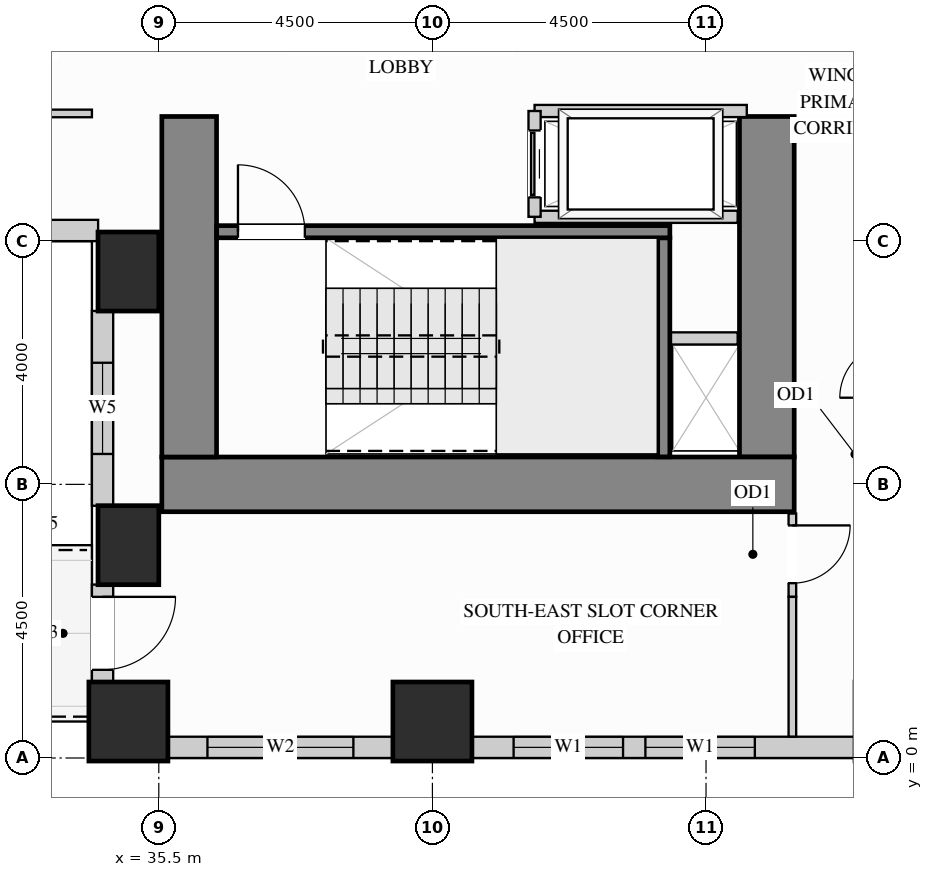
"""IFC4 building model, lengths in metres.
Left out: names, types, materials, properties, quantities, classifications, styles, units other than length and angle.
Written with IfcOpenShell. Run it as: python <this file> out.ifc"""

import sys

from ifc_helpers import new_model, si_unit, direction, frame, frame_2d, origin, origin_2d, place, context, subcontext, project, spatial, rectangle, extrude, source, transform, mapped, element, fill, save


model = new_model("IFC4")
c1 = context("Model", 3, precision=1e-05, world=origin(), true_north=direction((0.0, 1.0)))
c2 = subcontext(c1, "Body", "Model", "MODEL_VIEW")
j1 = project(units=[si_unit("LENGTHUNIT", "METRE"), si_unit("PLANEANGLEUNIT", "RADIAN")], contexts=[c1])
p1 = place(None, origin())
s1 = spatial("IfcSite", under=j1, at=p1, CompositionType="ELEMENT")
p2 = place(p1, origin())
s2 = spatial("IfcBuilding", under=s1, at=p2, CompositionType="ELEMENT")
p3 = place(p2, frame((0.0, 0.0, 62.1)))
s3 = spatial("IfcBuildingStorey", under=s2, at=p3, CompositionType="ELEMENT", Elevation=62.1)
m1 = source(origin(), c2, "Body", "SweptSolid", [
    extrude(rectangle(XDim=1.0, YDim=1.3, at=origin_2d()), origin(), (0.0, 0.0, 1.0), 3.38),
])
for number, where, z_axis, x_axis in (
    (1, (35.0, 3.5, 0.0), (0.0, 0.0, 1.0), (1.0, 0.0, 0.0)),
    (2, (35.0, 8.0, 0.0), (0.0, 0.0, 1.0), (1.0, 0.0, 0.0)),
):
    element("IfcColumn", number, at=place(p3, frame(where, z_axis=z_axis, x_axis=x_axis)), inside=s3, PredefinedType="COLUMN", context=c2, shape_type="MappedRepresentation", body=[
        mapped(m1, transform((0.0, 0.0, 0.0), x_axis=(1.0, 0.0, 0.0), y_axis=(0.0, 1.0, 0.0), z_axis=(0.0, 0.0, 1.0))),
    ])
m2 = source(origin(), c2, "Body", "SweptSolid", [
    extrude(rectangle(XDim=1.3, YDim=1.3, at=origin_2d()), origin(), (0.0, 0.0, 1.0), 3.38),
])
for number, where, z_axis, x_axis in (
    (3, (35.0, 0.6, 0.0), (0.0, 0.0, 1.0), (1.0, 0.0, 0.0)),
    (4, (40.0, 0.6, 0.0), (0.0, 0.0, 1.0), (1.0, 0.0, 0.0)),
):
    element("IfcColumn", number, at=place(p3, frame(where, z_axis=z_axis, x_axis=x_axis)), inside=s3, PredefinedType="COLUMN", context=c2, shape_type="MappedRepresentation", body=[
        mapped(m2, transform((0.0, 0.0, 0.0), x_axis=(1.0, 0.0, 0.0), y_axis=(0.0, 1.0, 0.0), z_axis=(0.0, 0.0, 1.0))),
    ])
m3 = source(origin(), c2, "Body", "SweptSolid", [
    extrude(rectangle(XDim=5.6, YDim=0.9, at=frame_2d((2.8, 0.0))), origin(), (0.0, 0.0, 1.0), 3.38),
])
p4 = place(p3, frame((45.5, 4.95, 0.0), z_axis=(0.0, 0.0, 1.0), x_axis=(0.0, 1.0, 0.0)))
e5 = element("IfcWall", 5, at=p4, inside=s3, PredefinedType="SHEAR", context=c2, shape_type="MappedRepresentation", body=[
    mapped(m3, transform((0.0, 0.0, 0.0), x_axis=(1.0, 0.0, 0.0), y_axis=(0.0, 1.0, 0.0), z_axis=(0.0, 0.0, 1.0))),
])
m4 = source(origin(), c2, "Body", "SweptSolid", [
    extrude(rectangle(XDim=10.4, YDim=0.9, at=frame_2d((5.2, 0.0))), origin(), (0.0, 0.0, 1.0), 3.38),
])
p5 = place(p3, frame((35.55, 4.5, 0.0), z_axis=(0.0, 0.0, 1.0), x_axis=(1.0, 0.0, 0.0)))
e6 = element("IfcWall", 6, at=p5, inside=s3, PredefinedType="SHEAR", context=c2, shape_type="MappedRepresentation", body=[
    mapped(m4, transform((0.0, 0.0, 0.0), x_axis=(1.0, 0.0, 0.0), y_axis=(0.0, 1.0, 0.0), z_axis=(0.0, 0.0, 1.0))),
])
p6 = place(p3, frame((36.0, 4.95, 0.0), z_axis=(0.0, 0.0, 1.0), x_axis=(0.0, 1.0, 0.0)))
e7 = element("IfcWall", 7, at=p6, inside=s3, PredefinedType="SHEAR", context=c2, shape_type="MappedRepresentation", body=[
    mapped(m3, transform((0.0, 0.0, 0.0), x_axis=(1.0, 0.0, 0.0), y_axis=(0.0, 1.0, 0.0), z_axis=(0.0, 0.0, 1.0))),
])
p7 = place(p3, frame((30.998, 8.675, 0.0), z_axis=(0.0, 0.0, 1.0), x_axis=(1.0, 0.0, 0.0)))
e8 = element("IfcWall", 8, at=p7, inside=s3, PredefinedType="SOLIDWALL", context=c2, shape_type="SweptSolid", body=[
    extrude(rectangle(XDim=3.504, YDim=0.35, at=frame_2d((1.752, 0.0))), origin(), (0.0, 0.0, 1.0), 3.365),
])
p8 = place(p7, frame((1.002, 0.0, 0.78)))
e9 = element("IfcOpeningElement", 9, at=p8, cuts=e8, PredefinedType="OPENING", context=c2, shape_type="SweptSolid", body=[
    extrude(rectangle(XDim=1.5, YDim=2.0, at=frame_2d((0.75, 1.0))), frame((0.0, 0.185, 0.0), z_axis=(0.0, -1.0, 0.0), x_axis=(1.0, 0.0, 0.0)), (0.0, 0.0, 1.0), 0.37),
])
p9 = place(p3, frame((34.575, 7.352, 0.0), z_axis=(0.0, 0.0, 1.0), x_axis=(0.0, -1.0, 0.0)))
e10 = element("IfcWall", 10, at=p9, inside=s3, PredefinedType="SOLIDWALL", context=c2, shape_type="SweptSolid", body=[
    extrude(rectangle(XDim=3.204, YDim=0.35, at=frame_2d((1.602, 0.0))), origin(), (0.0, 0.0, 1.0), 2.51),
])
p10 = place(p9, frame((0.852, 0.0, 0.78)))
e11 = element("IfcOpeningElement", 11, at=p10, cuts=e10, PredefinedType="OPENING", context=c2, shape_type="SweptSolid", body=[
    extrude(rectangle(XDim=1.5, YDim=1.55, at=frame_2d((0.75, 0.775))), frame((0.0, 0.185, 0.0), z_axis=(0.0, -1.0, 0.0), x_axis=(1.0, 0.0, 0.0)), (0.0, 0.0, 1.0), 0.37),
])
p11 = place(p3, frame((34.575, 2.852, 0.0), z_axis=(0.0, 0.0, 1.0), x_axis=(0.0, -1.0, 0.0)))
e12 = element("IfcWall", 12, at=p11, inside=s3, PredefinedType="SOLIDWALL", context=c2, shape_type="SweptSolid", body=[
    extrude(rectangle(XDim=1.604, YDim=0.35, at=frame_2d((0.802, 0.0))), origin(), (0.0, 0.0, 1.0), 2.51),
])
p12 = place(p11, frame((0.202, 0.0, 0.0)))
e13 = element("IfcOpeningElement", 13, at=p12, cuts=e12, PredefinedType="OPENING", context=c2, shape_type="SweptSolid", body=[
    extrude(rectangle(XDim=1.2, YDim=2.15, at=frame_2d((0.6, 1.075))), frame((0.0, 0.185, 0.0), z_axis=(0.0, -1.0, 0.0), x_axis=(1.0, 0.0, 0.0)), (0.0, 0.0, 1.0), 0.37),
])
p13 = place(p3, frame((35.648, 0.175, 0.0), z_axis=(0.0, 0.0, 1.0), x_axis=(1.0, 0.0, 0.0)))
e14 = element("IfcWall", 14, at=p13, inside=s3, PredefinedType="SOLIDWALL", context=c2, shape_type="SweptSolid", body=[
    extrude(rectangle(XDim=3.704, YDim=0.35, at=frame_2d((1.852, 0.0))), origin(), (0.0, 0.0, 1.0), 2.51),
])
p14 = place(p13, frame((0.652, 0.0, 0.78)))
e15 = element("IfcOpeningElement", 15, at=p14, cuts=e14, PredefinedType="OPENING", context=c2, shape_type="SweptSolid", body=[
    extrude(rectangle(XDim=2.4, YDim=1.55, at=frame_2d((1.2, 0.775))), frame((0.0, 0.185, 0.0), z_axis=(0.0, -1.0, 0.0), x_axis=(1.0, 0.0, 0.0)), (0.0, 0.0, 1.0), 0.37),
])
p15 = place(p3, frame((40.648, 0.175, 0.0), z_axis=(0.0, 0.0, 1.0), x_axis=(1.0, 0.0, 0.0)))
e16 = element("IfcWall", 16, at=p15, inside=s3, PredefinedType="SOLIDWALL", context=c2, shape_type="SweptSolid", body=[
    extrude(rectangle(XDim=6.304, YDim=0.35, at=frame_2d((3.152, 0.0))), origin(), (0.0, 0.0, 1.0), 2.51),
])
p16 = place(p15, frame((0.687, 0.0, 0.78)))
e17 = element("IfcOpeningElement", 17, at=p16, cuts=e16, PredefinedType="OPENING", context=c2, shape_type="SweptSolid", body=[
    extrude(rectangle(XDim=1.8, YDim=1.55, at=frame_2d((0.9, 0.775))), frame((0.0, 0.185, 0.0), z_axis=(0.0, -1.0, 0.0), x_axis=(1.0, 0.0, 0.0)), (0.0, 0.0, 1.0), 0.37),
])
p17 = place(p15, frame((2.855, 0.0, 0.78)))
e18 = element("IfcOpeningElement", 18, at=p17, cuts=e16, PredefinedType="OPENING", context=c2, shape_type="SweptSolid", body=[
    extrude(rectangle(XDim=1.8, YDim=1.55, at=frame_2d((0.9, 0.775))), frame((0.0, 0.185, 0.0), z_axis=(0.0, -1.0, 0.0), x_axis=(1.0, 0.0, 0.0)), (0.0, 0.0, 1.0), 0.37),
])
p18 = place(p3, frame((45.92, 2.65, 0.0), z_axis=(0.0, 0.0, 1.0), x_axis=(0.0, 1.0, 0.0)))
e19 = element("IfcWall", 19, at=p18, inside=s3, PredefinedType="PARTITIONING", context=c2, shape_type="SweptSolid", body=[
    extrude(rectangle(XDim=1.37, YDim=0.125, at=frame_2d((0.685, 0.0))), origin(), (0.0, 0.0, 1.0), 3.365),
])
p19 = place(p18, frame((0.225, 0.0, 0.0)))
e20 = element("IfcOpeningElement", 20, at=p19, cuts=e19, PredefinedType="OPENING", context=c2, shape_type="SweptSolid", body=[
    extrude(rectangle(XDim=0.95, YDim=2.15, at=frame_2d((0.475, 1.075))), frame((0.0, 0.073, 0.0), z_axis=(0.0, -1.0, 0.0), x_axis=(1.0, 0.0, 0.0)), (0.0, 0.0, 1.0), 0.145),
])
m5 = source(origin(), c2, "Body", "SweptSolid", [
    extrude(rectangle(XDim=2.298, YDim=0.125, at=frame_2d((1.149, 0.0))), origin(), (0.0, 0.0, 1.0), 3.365),
])
p20 = place(p3, frame((45.92, 0.352, 0.0), z_axis=(0.0, 0.0, 1.0), x_axis=(0.0, 1.0, 0.0)))
e21 = element("IfcWall", 21, at=p20, inside=s3, PredefinedType="PARTITIONING", context=c2, shape_type="MappedRepresentation", body=[
    mapped(m5, transform((0.0, 0.0, 0.0), x_axis=(1.0, 0.0, 0.0), y_axis=(0.0, 1.0, 0.0), z_axis=(0.0, 0.0, 1.0))),
])
p21 = place(p3, frame((26.95, 10.6, 0.0), z_axis=(0.0, 0.0, 1.0), x_axis=(1.0, 0.0, 0.0)))
e22 = element("IfcWall", 22, at=p21, inside=s3, PredefinedType="PARTITIONING", context=c2, shape_type="SweptSolid", body=[
    extrude(rectangle(XDim=7.45, YDim=0.125, at=frame_2d((3.725, 0.0))), origin(), (0.0, 0.0, 1.0), 3.365),
])
p22 = place(p21, frame((4.683, 0.0, 0.0)))
e23 = element("IfcOpeningElement", 23, at=p22, cuts=e22, PredefinedType="OPENING", context=c2, shape_type="SweptSolid", body=[
    extrude(rectangle(XDim=0.95, YDim=2.15, at=frame_2d((0.475, 1.075))), frame((0.0, 0.073, 0.0), z_axis=(0.0, -1.0, 0.0), x_axis=(1.0, 0.0, 0.0)), (0.0, 0.0, 1.0), 0.145),
])
m6 = source(origin(), c2, "Body", "SweptSolid", [
    extrude(rectangle(XDim=1.17, YDim=0.2, at=frame_2d((0.585, 0.0))), origin(), (0.0, 0.0, 1.0), 3.365),
])
p23 = place(p3, frame((43.85, 6.9, 0.0), z_axis=(0.0, 0.0, 1.0), x_axis=(1.0, 0.0, 0.0)))
e24 = element("IfcWall", 24, at=p23, inside=s3, PredefinedType="PARTITIONING", context=c2, shape_type="MappedRepresentation", body=[
    mapped(m6, transform((0.0, 0.0, 0.0), x_axis=(1.0, 0.0, 0.0), y_axis=(0.0, 1.0, 0.0), z_axis=(0.0, 0.0, 1.0))),
])
m7 = source(origin(), c2, "Body", "SweptSolid", [
    extrude(rectangle(XDim=3.49, YDim=0.2, at=frame_2d((1.745, 0.0))), origin(), (0.0, 0.0, 1.0), 3.365),
])
p24 = place(p3, frame((41.68, 10.64, 0.0), z_axis=(0.0, 0.0, 1.0), x_axis=(1.0, 0.0, 0.0)))
e25 = element("IfcWall", 25, at=p24, inside=s3, PredefinedType="PARTITIONING", context=c2, shape_type="MappedRepresentation", body=[
    mapped(m7, transform((0.0, 0.0, 0.0), x_axis=(1.0, 0.0, 0.0), y_axis=(0.0, 1.0, 0.0), z_axis=(0.0, 0.0, 1.0))),
])
m8 = source(origin(), c2, "Body", "SweptSolid", [
    extrude(rectangle(XDim=3.34, YDim=0.2, at=frame_2d((1.67, 0.0))), origin(), (0.0, 0.0, 1.0), 3.365),
])
p25 = place(p3, frame((41.68, 8.9, 0.0), z_axis=(0.0, 0.0, 1.0), x_axis=(1.0, 0.0, 0.0)))
e26 = element("IfcWall", 26, at=p25, inside=s3, PredefinedType="PARTITIONING", context=c2, shape_type="MappedRepresentation", body=[
    mapped(m8, transform((0.0, 0.0, 0.0), x_axis=(1.0, 0.0, 0.0), y_axis=(0.0, 1.0, 0.0), z_axis=(0.0, 0.0, 1.0))),
])
p26 = place(p3, frame((41.68, 8.9, 0.0), z_axis=(0.0, 0.0, 1.0), x_axis=(0.0, 1.0, 0.0)))
e27 = element("IfcWall", 27, at=p26, inside=s3, PredefinedType="PARTITIONING", context=c2, shape_type="SweptSolid", body=[
    extrude(rectangle(XDim=1.74, YDim=0.2, at=frame_2d((0.87, 0.0))), origin(), (0.0, 0.0, 1.0), 3.365),
])
p27 = place(p26, frame((0.32, 0.0, 0.0)))
e28 = element("IfcOpeningElement", 28, at=p27, cuts=e27, PredefinedType="OPENING", context=c2, shape_type="SweptSolid", body=[
    extrude(rectangle(XDim=1.1, YDim=2.2, at=frame_2d((0.55, 1.1))), frame((0.0, 0.11, 0.0), z_axis=(0.0, -1.0, 0.0), x_axis=(1.0, 0.0, 0.0)), (0.0, 0.0, 1.0), 0.22),
])
m9 = source(origin(), c2, "Body", "SweptSolid", [
    extrude(rectangle(XDim=3.603, YDim=0.2, at=frame_2d((1.802, 0.0))), origin(), (0.0, 0.0, 1.0), 3.38),
])
p28 = place(p3, frame((43.805, 4.952, 0.0), z_axis=(0.0, 0.0, 1.0), x_axis=(0.0, 1.0, 0.0)))
e29 = element("IfcWall", 29, at=p28, inside=s3, PredefinedType="SHEAR", context=c2, shape_type="MappedRepresentation", body=[
    mapped(m9, transform((0.0, 0.0, 0.0), x_axis=(1.0, 0.0, 0.0), y_axis=(0.0, 1.0, 0.0), z_axis=(0.0, 0.0, 1.0))),
])
p29 = place(p3, frame((36.452, 8.655, 0.0), z_axis=(0.0, 0.0, 1.0), x_axis=(1.0, 0.0, 0.0)))
e30 = element("IfcWall", 30, at=p29, inside=s3, PredefinedType="SHEAR", context=c2, shape_type="SweptSolid", body=[
    extrude(rectangle(XDim=7.453, YDim=0.2, at=frame_2d((3.727, 0.0))), origin(), (0.0, 0.0, 1.0), 3.38),
])
p30 = place(p29, frame((0.35, 0.0, 0.0)))
e31 = element("IfcOpeningElement", 31, at=p30, cuts=e30, PredefinedType="OPENING", context=c2, shape_type="SweptSolid", body=[
    extrude(rectangle(XDim=1.1, YDim=2.15, at=frame_2d((0.55, 1.075))), frame((0.0, 0.11, 0.0), z_axis=(0.0, -1.0, 0.0), x_axis=(1.0, 0.0, 0.0)), (0.0, 0.0, 1.0), 0.22),
])
m10 = source(origin(), c2, "Body", "SweptSolid", [
    extrude(rectangle(XDim=1.2, YDim=2.15, at=frame_2d((0.6, 1.075))), frame((0.0, 0.025, 0.0), z_axis=(0.0, -1.0, 0.0), x_axis=(1.0, 0.0, 0.0)), (0.0, 0.0, 1.0), 0.05),
])
p31 = place(p12, frame((1.2, 0.0, 0.0), z_axis=(0.0, 0.0, 1.0), x_axis=(-1.0, 0.0, 0.0)))
e32 = element("IfcDoor", 32, at=p31, inside=s3, OperationType="SINGLE_SWING_LEFT", PredefinedType="DOOR", context=c2, shape_type="MappedRepresentation", body=[
    mapped(m10, transform((0.0, 0.0, 0.0), x_axis=(1.0, 0.0, 0.0), y_axis=(0.0, 1.0, 0.0), z_axis=(0.0, 0.0, 1.0))),
])
fill(e13, e32)
m11 = source(origin(), c2, "Body", "SweptSolid", [
    extrude(rectangle(XDim=1.1, YDim=2.2, at=frame_2d((0.55, 1.1))), frame((0.0, 0.025, 0.0), z_axis=(0.0, -1.0, 0.0), x_axis=(1.0, 0.0, 0.0)), (0.0, 0.0, 1.0), 0.05),
])
p32 = place(p27, origin())
e33 = element("IfcDoor", 33, at=p32, inside=s3, OperationType="SLIDING_TO_LEFT", PredefinedType="DOOR", context=c2, shape_type="MappedRepresentation", body=[
    mapped(m11, transform((0.0, 0.0, 0.0), x_axis=(1.0, 0.0, 0.0), y_axis=(0.0, 1.0, 0.0), z_axis=(0.0, 0.0, 1.0))),
])
fill(e28, e33)
m12 = source(origin(), c2, "Body", "SweptSolid", [
    extrude(rectangle(XDim=0.95, YDim=2.15, at=frame_2d((0.475, 1.075))), frame((0.0, 0.025, 0.0), z_axis=(0.0, -1.0, 0.0), x_axis=(1.0, 0.0, 0.0)), (0.0, 0.0, 1.0), 0.05),
])
p33 = place(p19, origin())
e34 = element("IfcDoor", 34, at=p33, inside=s3, OperationType="SINGLE_SWING_RIGHT", PredefinedType="DOOR", context=c2, shape_type="MappedRepresentation", body=[
    mapped(m12, transform((0.0, 0.0, 0.0), x_axis=(1.0, 0.0, 0.0), y_axis=(0.0, 1.0, 0.0), z_axis=(0.0, 0.0, 1.0))),
])
fill(e20, e34)
m13 = source(origin(), c2, "Body", "SweptSolid", [
    extrude(rectangle(XDim=1.1, YDim=2.15, at=frame_2d((0.55, 1.075))), frame((0.0, 0.025, 0.0), z_axis=(0.0, -1.0, 0.0), x_axis=(1.0, 0.0, 0.0)), (0.0, 0.0, 1.0), 0.05),
])
p34 = place(p30, origin())
e35 = element("IfcDoor", 35, at=p34, inside=s3, OperationType="SINGLE_SWING_LEFT", PredefinedType="DOOR", context=c2, shape_type="MappedRepresentation", body=[
    mapped(m13, transform((0.0, 0.0, 0.0), x_axis=(1.0, 0.0, 0.0), y_axis=(0.0, 1.0, 0.0), z_axis=(0.0, 0.0, 1.0))),
])
fill(e31, e35)
m14 = source(origin(), c2, "Body", "SweptSolid", [
    extrude(rectangle(XDim=1.8, YDim=1.55, at=frame_2d((0.9, 0.775))), frame((0.0, 0.03, 0.0), z_axis=(0.0, -1.0, 0.0), x_axis=(1.0, 0.0, 0.0)), (0.0, 0.0, 1.0), 0.06),
])
p35 = place(p16, origin())
e36 = element("IfcWindow", 36, at=p35, inside=s3, PartitioningType="SINGLE_PANEL", PredefinedType="WINDOW", context=c2, shape_type="MappedRepresentation", body=[
    mapped(m14, transform((0.0, 0.0, 0.0), x_axis=(1.0, 0.0, 0.0), y_axis=(0.0, 1.0, 0.0), z_axis=(0.0, 0.0, 1.0))),
])
fill(e17, e36)
p36 = place(p17, origin())
e37 = element("IfcWindow", 37, at=p36, inside=s3, PartitioningType="SINGLE_PANEL", PredefinedType="WINDOW", context=c2, shape_type="MappedRepresentation", body=[
    mapped(m14, transform((0.0, 0.0, 0.0), x_axis=(1.0, 0.0, 0.0), y_axis=(0.0, 1.0, 0.0), z_axis=(0.0, 0.0, 1.0))),
])
fill(e18, e37)
m15 = source(origin(), c2, "Body", "SweptSolid", [
    extrude(rectangle(XDim=2.4, YDim=1.55, at=frame_2d((1.2, 0.775))), frame((0.0, 0.03, 0.0), z_axis=(0.0, -1.0, 0.0), x_axis=(1.0, 0.0, 0.0)), (0.0, 0.0, 1.0), 0.06),
])
p37 = place(p14, origin())
e38 = element("IfcWindow", 38, at=p37, inside=s3, PartitioningType="SINGLE_PANEL", PredefinedType="WINDOW", context=c2, shape_type="MappedRepresentation", body=[
    mapped(m15, transform((0.0, 0.0, 0.0), x_axis=(1.0, 0.0, 0.0), y_axis=(0.0, 1.0, 0.0), z_axis=(0.0, 0.0, 1.0))),
])
fill(e15, e38)
m16 = source(origin(), c2, "Body", "SweptSolid", [
    extrude(rectangle(XDim=1.5, YDim=1.55, at=frame_2d((0.75, 0.775))), frame((0.0, 0.03, 0.0), z_axis=(0.0, -1.0, 0.0), x_axis=(1.0, 0.0, 0.0)), (0.0, 0.0, 1.0), 0.06),
])
p38 = place(p10, origin())
e39 = element("IfcWindow", 39, at=p38, inside=s3, PartitioningType="SINGLE_PANEL", PredefinedType="WINDOW", context=c2, shape_type="MappedRepresentation", body=[
    mapped(m16, transform((0.0, 0.0, 0.0), x_axis=(1.0, 0.0, 0.0), y_axis=(0.0, 1.0, 0.0), z_axis=(0.0, 0.0, 1.0))),
])
fill(e11, e39)
save(model, sys.argv[1])
